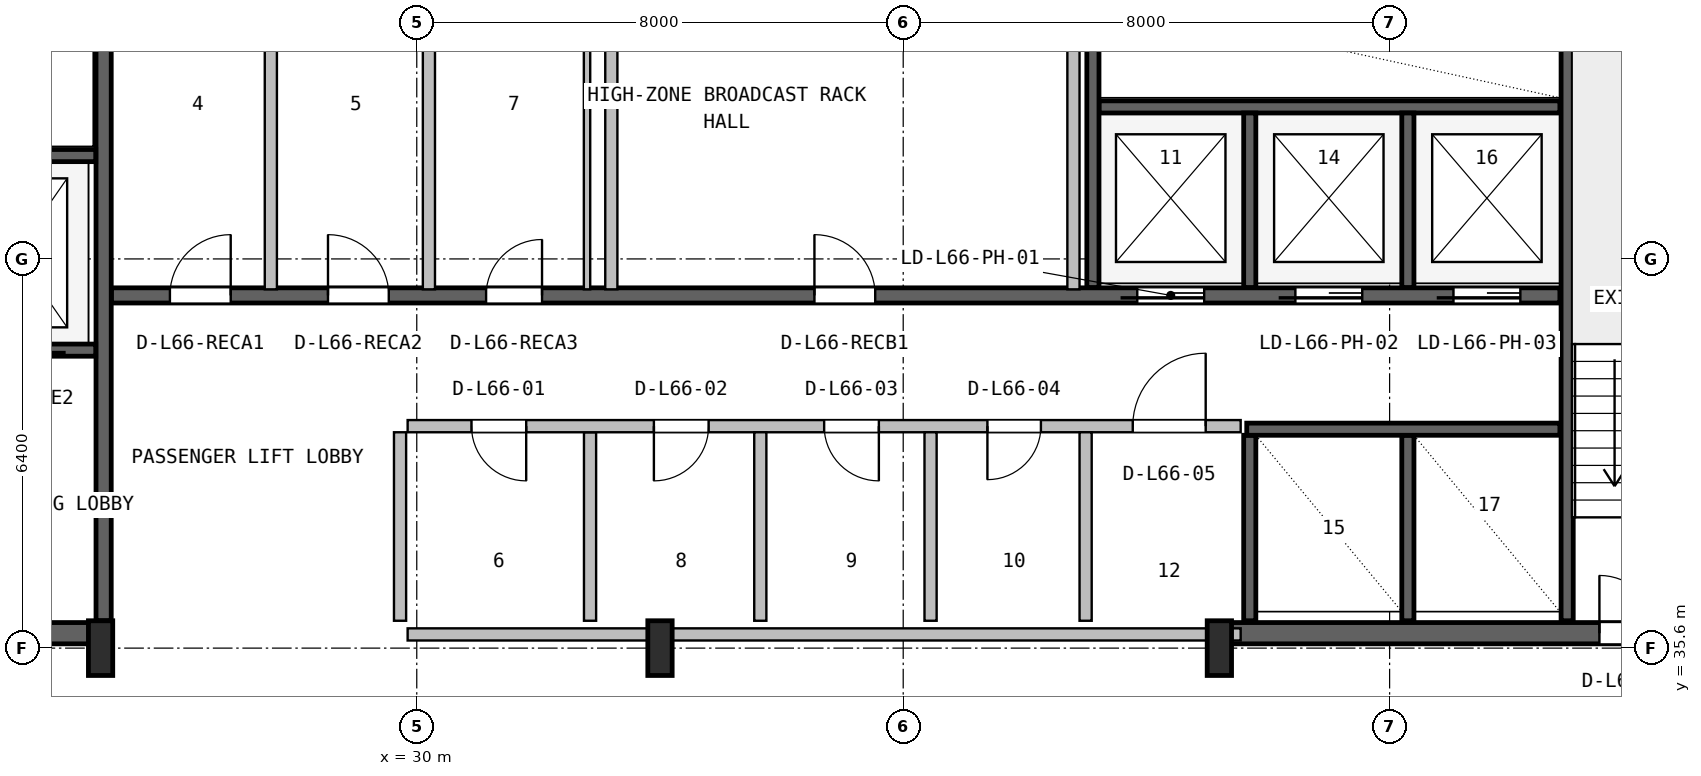
"""IFC4 building model, lengths in metres.
Left out: names, types, materials, properties, quantities, classifications, styles, units other than length and angle.
Written with IfcOpenShell. Run it as: python <this file> out.ifc"""

import sys

from ifc_helpers import new_model, si_unit, direction, frame, frame_2d, origin, origin_2d, place, context, subcontext, project, spatial, rectangle, i_section, extrude, source, transform, mapped, element, fill, save


model = new_model("IFC4")
c1 = context("Model", 3, precision=1e-05, world=origin(), true_north=direction((0.0, 1.0)))
c2 = subcontext(c1, "Body", "Model", "MODEL_VIEW")
j1 = project(units=[si_unit("LENGTHUNIT", "METRE"), si_unit("PLANEANGLEUNIT", "RADIAN")], contexts=[c1])
p1 = place(None, origin())
s1 = spatial("IfcSite", under=j1, at=p1, CompositionType="ELEMENT")
p2 = place(p1, origin())
s2 = spatial("IfcBuilding", under=s1, at=p2, CompositionType="ELEMENT")
p3 = place(p2, frame((0.0, 0.0, 266.0)))
s3 = spatial("IfcBuildingStorey", under=s2, at=p3, CompositionType="ELEMENT", Elevation=266.0)
p4 = place(p3, frame((15.67, 35.845, 0.0), z_axis=(0.0, 0.0, 1.0), x_axis=(1.0, 0.0, 0.0)))
e1 = element("IfcWall", 1, at=p4, inside=s3, PredefinedType="SHEAR", context=c2, shape_type="SweptSolid", body=[
    extrude(rectangle(XDim=9.13, YDim=0.35, at=frame_2d((4.565, 0.0))), origin(), (0.0, 0.0, 1.0), 3.55),
])
p5 = place(p4, frame((5.4, 0.0, 0.0)))
e2 = element("IfcOpeningElement", 2, at=p5, cuts=e1, PredefinedType="OPENING", context=c2, shape_type="SweptSolid", body=[
    extrude(rectangle(XDim=1.0, YDim=2.1, at=frame_2d((0.5, 1.05))), frame((0.0, 0.185, 0.0), z_axis=(0.0, -1.0, 0.0), x_axis=(1.0, 0.0, 0.0)), (0.0, 0.0, 1.0), 0.37),
])
p6 = place(p3, frame((43.2, 35.845, 0.0), z_axis=(0.0, 0.0, 1.0), x_axis=(1.0, 0.0, 0.0)))
e3 = element("IfcWall", 3, at=p6, inside=s3, PredefinedType="SHEAR", context=c2, shape_type="SweptSolid", body=[
    extrude(rectangle(XDim=9.13, YDim=0.35, at=frame_2d((4.565, 0.0))), origin(), (0.0, 0.0, 1.0), 3.55),
])
p7 = place(p6, frame((6.25, 0.0, 0.0)))
e4 = element("IfcOpeningElement", 4, at=p7, cuts=e3, PredefinedType="OPENING", context=c2, shape_type="SweptSolid", body=[
    extrude(rectangle(XDim=0.95, YDim=2.1, at=frame_2d((0.475, 1.05))), frame((0.0, 0.185, 0.0), z_axis=(0.0, -1.0, 0.0), x_axis=(1.0, 0.0, 0.0)), (0.0, 0.0, 1.0), 0.37),
])
m1 = source(origin(), c2, "Body", "SweptSolid", [
    extrude(i_section(OverallWidth=0.4, OverallDepth=0.9, WebThickness=0.016, FlangeThickness=0.028, FilletRadius=0.016, at=origin_2d()), origin(), (0.0, 0.0, 1.0), 3.8),
])
for number, where, z_axis, x_axis in (
    (5, (24.8, 35.6, 0.0), (0.0, 0.0, 1.0), (1.0, 0.0, 0.0)),
    (6, (34.0, 35.6, 0.0), (0.0, 0.0, 1.0), (1.0, 0.0, 0.0)),
    (7, (43.2, 35.6, 0.0), (0.0, 0.0, 1.0), (1.0, 0.0, 0.0)),
):
    element("IfcColumn", number, at=place(p3, frame(where, z_axis=z_axis, x_axis=x_axis)), inside=s3, PredefinedType="COLUMN", context=c2, shape_type="MappedRepresentation", body=[
        mapped(m1, transform((0.0, 0.0, 0.0), x_axis=(1.0, 0.0, 0.0), y_axis=(0.0, 1.0, 0.0), z_axis=(0.0, 0.0, 1.0), scale=1.0)),
    ])
p8 = place(p3, frame((24.85, 36.05, 0.0), z_axis=(0.0, 0.0, 1.0), x_axis=(0.0, 1.0, 0.0)))
e8 = element("IfcWall", 8, at=p8, inside=s3, PredefinedType="SHEAR", context=c2, shape_type="SweptSolid", body=[
    extrude(rectangle(XDim=10.45, YDim=0.25, at=frame_2d((5.225, 0.0))), origin(), (0.0, 0.0, 1.0), 3.55),
])
p9 = place(p3, frame((19.2, 40.5, 0.0), z_axis=(0.0, 0.0, 1.0), x_axis=(1.0, 0.0, 0.0)))
e9 = element("IfcWall", 9, at=p9, inside=s3, PredefinedType="SHEAR", context=c2, shape_type="SweptSolid", body=[
    extrude(rectangle(XDim=5.52, YDim=0.2, at=frame_2d((2.76, 0.0))), origin(), (0.0, 0.0, 1.0), 3.55),
])
p10 = place(p9, frame((1.05, 0.0, 0.0)))
e10 = element("IfcOpeningElement", 10, at=p10, cuts=e9, PredefinedType="OPENING", context=c2, shape_type="SweptSolid", body=[
    extrude(rectangle(XDim=1.1, YDim=2.18, at=frame_2d((0.55, 1.09))), frame((0.0, 0.11, 0.0), z_axis=(0.0, -1.0, 0.0), x_axis=(1.0, 0.0, 0.0)), (0.0, 0.0, 1.0), 0.22),
])
p11 = place(p9, frame((3.65, 0.0, 0.0)))
e11 = element("IfcOpeningElement", 11, at=p11, cuts=e9, PredefinedType="OPENING", context=c2, shape_type="SweptSolid", body=[
    extrude(rectangle(XDim=1.1, YDim=2.18, at=frame_2d((0.55, 1.09))), frame((0.0, 0.11, 0.0), z_axis=(0.0, -1.0, 0.0), x_axis=(1.0, 0.0, 0.0)), (0.0, 0.0, 1.0), 0.22),
])
p12 = place(p3, frame((19.2, 43.7, 0.0), z_axis=(0.0, 0.0, 1.0), x_axis=(1.0, 0.0, 0.0)))
e12 = element("IfcWall", 12, at=p12, inside=s3, PredefinedType="SHEAR", context=c2, shape_type="SweptSolid", body=[
    extrude(rectangle(XDim=5.52, YDim=0.2, at=frame_2d((2.76, 0.0))), origin(), (0.0, 0.0, 1.0), 3.55),
])
p13 = place(p3, frame((48.92, 36.05, 0.0), z_axis=(0.0, 0.0, 1.0), x_axis=(0.0, 1.0, 0.0)))
e13 = element("IfcWall", 13, at=p13, inside=s3, PredefinedType="SHEAR", context=c2, shape_type="SweptSolid", body=[
    extrude(rectangle(XDim=10.5, YDim=0.2, at=frame_2d((5.25, 0.0))), origin(), (0.0, 0.0, 1.0), 3.55),
])
p14 = place(p3, frame((24.98, 41.4, 0.0), z_axis=(0.0, 0.0, 1.0), x_axis=(1.0, 0.0, 0.0)))
e14 = element("IfcWall", 14, at=p14, inside=s3, PredefinedType="SHEAR", context=c2, shape_type="SweptSolid", body=[
    extrude(rectangle(XDim=23.82, YDim=0.25, at=frame_2d((11.91, 0.0))), origin(), (0.0, 0.0, 1.0), 3.55),
])
p15 = place(p14, frame((16.87, 0.0, 0.0)))
e15 = element("IfcOpeningElement", 15, at=p15, cuts=e14, PredefinedType="OPENING", context=c2, shape_type="SweptSolid", body=[
    extrude(rectangle(XDim=1.1, YDim=2.18, at=frame_2d((0.55, 1.09))), frame((0.0, 0.135, 0.0), z_axis=(0.0, -1.0, 0.0), x_axis=(1.0, 0.0, 0.0)), (0.0, 0.0, 1.0), 0.27),
])
p16 = place(p14, frame((19.47, 0.0, 0.0)))
e16 = element("IfcOpeningElement", 16, at=p16, cuts=e14, PredefinedType="OPENING", context=c2, shape_type="SweptSolid", body=[
    extrude(rectangle(XDim=1.1, YDim=2.18, at=frame_2d((0.55, 1.09))), frame((0.0, 0.135, 0.0), z_axis=(0.0, -1.0, 0.0), x_axis=(1.0, 0.0, 0.0)), (0.0, 0.0, 1.0), 0.27),
])
p17 = place(p14, frame((22.07, 0.0, 0.0)))
e17 = element("IfcOpeningElement", 17, at=p17, cuts=e14, PredefinedType="OPENING", context=c2, shape_type="SweptSolid", body=[
    extrude(rectangle(XDim=1.1, YDim=2.18, at=frame_2d((0.55, 1.09))), frame((0.0, 0.135, 0.0), z_axis=(0.0, -1.0, 0.0), x_axis=(1.0, 0.0, 0.0)), (0.0, 0.0, 1.0), 0.27),
])
p18 = place(p14, frame((0.96, 0.0, 0.0)))
e18 = element("IfcOpeningElement", 18, at=p18, cuts=e14, PredefinedType="OPENING", context=c2, shape_type="SweptSolid", body=[
    extrude(rectangle(XDim=1.0, YDim=2.08, at=frame_2d((0.5, 1.04))), frame((0.0, 0.135, 0.0), z_axis=(0.0, -1.0, 0.0), x_axis=(1.0, 0.0, 0.0)), (0.0, 0.0, 1.0), 0.27),
])
p19 = place(p14, frame((3.56, 0.0, 0.0)))
e19 = element("IfcOpeningElement", 19, at=p19, cuts=e14, PredefinedType="OPENING", context=c2, shape_type="SweptSolid", body=[
    extrude(rectangle(XDim=1.0, YDim=2.08, at=frame_2d((0.5, 1.04))), frame((0.0, 0.135, 0.0), z_axis=(0.0, -1.0, 0.0), x_axis=(1.0, 0.0, 0.0)), (0.0, 0.0, 1.0), 0.27),
])
p20 = place(p14, frame((6.16, 0.0, 0.0)))
e20 = element("IfcOpeningElement", 20, at=p20, cuts=e14, PredefinedType="OPENING", context=c2, shape_type="SweptSolid", body=[
    extrude(rectangle(XDim=0.92, YDim=2.08, at=frame_2d((0.46, 1.04))), frame((0.0, 0.135, 0.0), z_axis=(0.0, -1.0, 0.0), x_axis=(1.0, 0.0, 0.0)), (0.0, 0.0, 1.0), 0.27),
])
p21 = place(p14, frame((11.56, 0.0, 0.0)))
e21 = element("IfcOpeningElement", 21, at=p21, cuts=e14, PredefinedType="OPENING", context=c2, shape_type="SweptSolid", body=[
    extrude(rectangle(XDim=1.0, YDim=2.08, at=frame_2d((0.5, 1.04))), frame((0.0, 0.135, 0.0), z_axis=(0.0, -1.0, 0.0), x_axis=(1.0, 0.0, 0.0)), (0.0, 0.0, 1.0), 0.27),
])
p22 = place(p3, frame((41.22, 44.5, 0.0), z_axis=(0.0, 0.0, 1.0), x_axis=(1.0, 0.0, 0.0)))
e22 = element("IfcWall", 22, at=p22, inside=s3, PredefinedType="SHEAR", context=c2, shape_type="SweptSolid", body=[
    extrude(rectangle(XDim=7.58, YDim=0.2, at=frame_2d((3.79, 0.0))), origin(), (0.0, 0.0, 1.0), 3.55),
])
p23 = place(p3, frame((41.12, 41.53, 0.0), z_axis=(0.0, 0.0, 1.0), x_axis=(0.0, 1.0, 0.0)))
e23 = element("IfcWall", 23, at=p23, inside=s3, PredefinedType="SHEAR", context=c2, shape_type="SweptSolid", body=[
    extrude(rectangle(XDim=5.02, YDim=0.2, at=frame_2d((2.51, 0.0))), origin(), (0.0, 0.0, 1.0), 3.55),
])
for number, where, z_axis, x_axis in (
    (24, (43.7, 41.53, 0.0), (0.0, 0.0, 1.0), (0.0, 1.0, 0.0)),
    (25, (46.3, 41.53, 0.0), (0.0, 0.0, 1.0), (0.0, 1.0, 0.0)),
):
    element("IfcWall", number, at=place(p3, frame(where, z_axis=z_axis, x_axis=x_axis)), inside=s3, PredefinedType="SHEAR", context=c2, shape_type="SweptSolid", body=[
        extrude(rectangle(XDim=2.87, YDim=0.2, at=frame_2d((1.435, 0.0))), origin(), (0.0, 0.0, 1.0), 3.55),
    ])
for number, where, z_axis, x_axis in (
    (26, (43.7, 36.05, 0.0), (0.0, 0.0, 1.0), (0.0, 1.0, 0.0)),
    (27, (46.3, 36.05, 0.0), (0.0, 0.0, 1.0), (0.0, 1.0, 0.0)),
):
    element("IfcWall", number, at=place(p3, frame(where, z_axis=z_axis, x_axis=x_axis)), inside=s3, PredefinedType="SHEAR", context=c2, shape_type="SweptSolid", body=[
        extrude(rectangle(XDim=3.05, YDim=0.2, at=frame_2d((1.525, 0.0))), origin(), (0.0, 0.0, 1.0), 3.55),
    ])
p24 = place(p3, frame((43.65, 39.2, 0.0), z_axis=(0.0, 0.0, 1.0), x_axis=(1.0, 0.0, 0.0)))
e28 = element("IfcWall", 28, at=p24, inside=s3, PredefinedType="SHEAR", context=c2, shape_type="SweptSolid", body=[
    extrude(rectangle(XDim=5.15, YDim=0.2, at=frame_2d((2.575, 0.0))), origin(), (0.0, 0.0, 1.0), 3.55),
])
p25 = place(p3, frame((29.85, 35.825, 0.0), z_axis=(0.0, 0.0, 1.0), x_axis=(1.0, 0.0, 0.0)))
e29 = element("IfcWall", 29, at=p25, inside=s3, PredefinedType="SOLIDWALL", context=c2, shape_type="SweptSolid", body=[
    extrude(rectangle(XDim=13.7, YDim=0.2, at=frame_2d((6.85, 0.0))), origin(), (0.0, 0.0, 1.0), 2.575),
])
p26 = place(p3, frame((32.85, 36.05, 0.0), z_axis=(0.0, 0.0, 1.0), x_axis=(0.0, 1.0, 0.0)))
e30 = element("IfcWall", 30, at=p26, inside=s3, PredefinedType="PLUMBINGWALL", context=c2, shape_type="SweptSolid", body=[
    extrude(rectangle(XDim=3.1, YDim=0.2, at=frame_2d((1.55, 0.0))), origin(), (0.0, 0.0, 1.0), 3.53),
])
p27 = place(p3, frame((29.85, 39.25, 0.0), z_axis=(0.0, 0.0, 1.0), x_axis=(1.0, 0.0, 0.0)))
e31 = element("IfcWall", 31, at=p27, inside=s3, PredefinedType="SOLIDWALL", context=c2, shape_type="SweptSolid", body=[
    extrude(rectangle(XDim=13.7, YDim=0.2, at=frame_2d((6.85, 0.0))), origin(), (0.0, 0.0, 1.0), 3.53),
])
p28 = place(p27, frame((1.05, 0.0, 0.0)))
e32 = element("IfcOpeningElement", 32, at=p28, cuts=e31, PredefinedType="OPENING", context=c2, shape_type="SweptSolid", body=[
    extrude(rectangle(XDim=0.9, YDim=2.06, at=frame_2d((0.45, 1.03))), frame((0.0, 0.11, 0.0), z_axis=(0.0, -1.0, 0.0), x_axis=(1.0, 0.0, 0.0)), (0.0, 0.0, 1.0), 0.22),
])
p29 = place(p27, frame((4.05, 0.0, 0.0)))
e33 = element("IfcOpeningElement", 33, at=p29, cuts=e31, PredefinedType="OPENING", context=c2, shape_type="SweptSolid", body=[
    extrude(rectangle(XDim=0.9, YDim=2.06, at=frame_2d((0.45, 1.03))), frame((0.0, 0.11, 0.0), z_axis=(0.0, -1.0, 0.0), x_axis=(1.0, 0.0, 0.0)), (0.0, 0.0, 1.0), 0.22),
])
p30 = place(p27, frame((6.85, 0.0, 0.0)))
e34 = element("IfcOpeningElement", 34, at=p30, cuts=e31, PredefinedType="OPENING", context=c2, shape_type="SweptSolid", body=[
    extrude(rectangle(XDim=0.9, YDim=2.06, at=frame_2d((0.45, 1.03))), frame((0.0, 0.11, 0.0), z_axis=(0.0, -1.0, 0.0), x_axis=(1.0, 0.0, 0.0)), (0.0, 0.0, 1.0), 0.22),
])
p31 = place(p27, frame((9.535, 0.0, 0.0)))
e35 = element("IfcOpeningElement", 35, at=p31, cuts=e31, PredefinedType="OPENING", context=c2, shape_type="SweptSolid", body=[
    extrude(rectangle(XDim=0.88, YDim=2.06, at=frame_2d((0.44, 1.03))), frame((0.0, 0.11, 0.0), z_axis=(0.0, -1.0, 0.0), x_axis=(1.0, 0.0, 0.0)), (0.0, 0.0, 1.0), 0.22),
])
p32 = place(p27, frame((11.925, 0.0, 0.0)))
e36 = element("IfcOpeningElement", 36, at=p32, cuts=e31, PredefinedType="OPENING", context=c2, shape_type="SweptSolid", body=[
    extrude(rectangle(XDim=1.2, YDim=2.1, at=frame_2d((0.6, 1.05))), frame((0.0, 0.11, 0.0), z_axis=(0.0, -1.0, 0.0), x_axis=(1.0, 0.0, 0.0)), (0.0, 0.0, 1.0), 0.22),
])
for number, where, z_axis, x_axis in (
    (37, (29.725, 36.05, 0.0), (0.0, 0.0, 1.0), (0.0, 1.0, 0.0)),
    (38, (35.65, 36.05, 0.0), (0.0, 0.0, 1.0), (0.0, 1.0, 0.0)),
    (39, (38.45, 36.05, 0.0), (0.0, 0.0, 1.0), (0.0, 1.0, 0.0)),
):
    element("IfcWall", number, at=place(p3, frame(where, z_axis=z_axis, x_axis=x_axis)), inside=s3, PredefinedType="PLUMBINGWALL", context=c2, shape_type="SweptSolid", body=[
        extrude(rectangle(XDim=3.1, YDim=0.2, at=frame_2d((1.55, 0.0))), origin(), (0.0, 0.0, 1.0), 3.53),
    ])
p33 = place(p3, frame((41.0, 36.05, 0.0), z_axis=(0.0, 0.0, 1.0), x_axis=(0.0, 1.0, 0.0)))
e40 = element("IfcWall", 40, at=p33, inside=s3, PredefinedType="SOLIDWALL", context=c2, shape_type="SweptSolid", body=[
    extrude(rectangle(XDim=3.1, YDim=0.2, at=frame_2d((1.55, 0.0))), origin(), (0.0, 0.0, 1.0), 3.53),
])
for number, where, z_axis, x_axis in (
    (41, (27.6, 41.5, 0.0), (0.0, 0.0, 1.0), (0.0, 1.0, 0.0)),
    (42, (30.2, 41.5, 0.0), (0.0, 0.0, 1.0), (0.0, 1.0, 0.0)),
):
    element("IfcWall", number, at=place(p3, frame(where, z_axis=z_axis, x_axis=x_axis)), inside=s3, PredefinedType="SOLIDWALL", context=c2, shape_type="SweptSolid", body=[
        extrude(rectangle(XDim=5.02, YDim=0.2, at=frame_2d((2.51, 0.0))), origin(), (0.0, 0.0, 1.0), 3.53),
    ])
p34 = place(p3, frame((32.8, 41.5, 0.0), z_axis=(0.0, 0.0, 1.0), x_axis=(0.0, 1.0, 0.0)))
e43 = element("IfcWall", 43, at=p34, inside=s3, PredefinedType="PARTITIONING", context=c2, shape_type="SweptSolid", body=[
    extrude(rectangle(XDim=5.02, YDim=0.105, at=frame_2d((2.51, 0.0))), origin(), (0.0, 0.0, 1.0), 3.53),
])
for number, where, z_axis, x_axis in (
    (44, (40.8, 41.5, 0.0), (0.0, 0.0, 1.0), (0.0, 1.0, 0.0)),
    (45, (33.2, 41.5, 0.0), (0.0, 0.0, 1.0), (0.0, 1.0, 0.0)),
):
    element("IfcWall", number, at=place(p3, frame(where, z_axis=z_axis, x_axis=x_axis)), inside=s3, PredefinedType="SOLIDWALL", context=c2, shape_type="SweptSolid", body=[
        extrude(rectangle(XDim=5.02, YDim=0.2, at=frame_2d((2.51, 0.0))), origin(), (0.0, 0.0, 1.0), 3.53),
    ])
m2 = source(origin(), c2, "Body", "SweptSolid", [
    extrude(rectangle(XDim=0.95, YDim=2.1, at=frame_2d((0.475, 1.05))), frame((0.0, 0.025, 0.0), z_axis=(0.0, -1.0, 0.0), x_axis=(1.0, 0.0, 0.0)), (0.0, 0.0, 1.0), 0.05),
])
p35 = place(p7, origin())
e46 = element("IfcDoor", 46, at=p35, inside=s3, OperationType="SINGLE_SWING_LEFT", PredefinedType="DOOR", context=c2, shape_type="MappedRepresentation", body=[
    mapped(m2, transform((0.0, 0.0, 0.0), x_axis=(1.0, 0.0, 0.0), y_axis=(0.0, 1.0, 0.0), z_axis=(0.0, 0.0, 1.0), scale=1.0)),
])
fill(e4, e46)
m3 = source(origin(), c2, "Body", "SweptSolid", [
    extrude(rectangle(XDim=1.1, YDim=2.18, at=frame_2d((0.55, 1.09))), frame((0.0, 0.025, 0.0), z_axis=(0.0, -1.0, 0.0), x_axis=(1.0, 0.0, 0.0)), (0.0, 0.0, 1.0), 0.05),
])
p36 = place(p15, frame((1.1, 0.0, 0.0), z_axis=(0.0, 0.0, 1.0), x_axis=(-1.0, 0.0, 0.0)))
e47 = element("IfcDoor", 47, at=p36, inside=s3, OperationType="SLIDING_TO_LEFT", PredefinedType="DOOR", context=c2, shape_type="MappedRepresentation", body=[
    mapped(m3, transform((0.0, 0.0, 0.0), x_axis=(1.0, 0.0, 0.0), y_axis=(0.0, 1.0, 0.0), z_axis=(0.0, 0.0, 1.0), scale=1.0)),
])
fill(e15, e47)
p37 = place(p16, frame((1.1, 0.0, 0.0), z_axis=(0.0, 0.0, 1.0), x_axis=(-1.0, 0.0, 0.0)))
e48 = element("IfcDoor", 48, at=p37, inside=s3, OperationType="SLIDING_TO_LEFT", PredefinedType="DOOR", context=c2, shape_type="MappedRepresentation", body=[
    mapped(m3, transform((0.0, 0.0, 0.0), x_axis=(1.0, 0.0, 0.0), y_axis=(0.0, 1.0, 0.0), z_axis=(0.0, 0.0, 1.0), scale=1.0)),
])
fill(e16, e48)
p38 = place(p17, frame((1.1, 0.0, 0.0), z_axis=(0.0, 0.0, 1.0), x_axis=(-1.0, 0.0, 0.0)))
e49 = element("IfcDoor", 49, at=p38, inside=s3, OperationType="SLIDING_TO_LEFT", PredefinedType="DOOR", context=c2, shape_type="MappedRepresentation", body=[
    mapped(m3, transform((0.0, 0.0, 0.0), x_axis=(1.0, 0.0, 0.0), y_axis=(0.0, 1.0, 0.0), z_axis=(0.0, 0.0, 1.0), scale=1.0)),
])
fill(e17, e49)
m4 = source(origin(), c2, "Body", "SweptSolid", [
    extrude(rectangle(XDim=1.0, YDim=2.08, at=frame_2d((0.5, 1.04))), frame((0.0, 0.025, 0.0), z_axis=(0.0, -1.0, 0.0), x_axis=(1.0, 0.0, 0.0)), (0.0, 0.0, 1.0), 0.05),
])
p39 = place(p18, origin())
e50 = element("IfcDoor", 50, at=p39, inside=s3, OperationType="SINGLE_SWING_RIGHT", PredefinedType="DOOR", context=c2, shape_type="MappedRepresentation", body=[
    mapped(m4, transform((0.0, 0.0, 0.0), x_axis=(1.0, 0.0, 0.0), y_axis=(0.0, 1.0, 0.0), z_axis=(0.0, 0.0, 1.0), scale=1.0)),
])
fill(e18, e50)
p40 = place(p19, origin())
e51 = element("IfcDoor", 51, at=p40, inside=s3, OperationType="SINGLE_SWING_LEFT", PredefinedType="DOOR", context=c2, shape_type="MappedRepresentation", body=[
    mapped(m4, transform((0.0, 0.0, 0.0), x_axis=(1.0, 0.0, 0.0), y_axis=(0.0, 1.0, 0.0), z_axis=(0.0, 0.0, 1.0), scale=1.0)),
])
fill(e19, e51)
m5 = source(origin(), c2, "Body", "SweptSolid", [
    extrude(rectangle(XDim=0.92, YDim=2.08, at=frame_2d((0.46, 1.04))), frame((0.0, 0.025, 0.0), z_axis=(0.0, -1.0, 0.0), x_axis=(1.0, 0.0, 0.0)), (0.0, 0.0, 1.0), 0.05),
])
p41 = place(p20, origin())
e52 = element("IfcDoor", 52, at=p41, inside=s3, OperationType="SINGLE_SWING_RIGHT", PredefinedType="DOOR", context=c2, shape_type="MappedRepresentation", body=[
    mapped(m5, transform((0.0, 0.0, 0.0), x_axis=(1.0, 0.0, 0.0), y_axis=(0.0, 1.0, 0.0), z_axis=(0.0, 0.0, 1.0), scale=1.0)),
])
fill(e20, e52)
p42 = place(p21, origin())
e53 = element("IfcDoor", 53, at=p42, inside=s3, OperationType="SINGLE_SWING_LEFT", PredefinedType="DOOR", context=c2, shape_type="MappedRepresentation", body=[
    mapped(m4, transform((0.0, 0.0, 0.0), x_axis=(1.0, 0.0, 0.0), y_axis=(0.0, 1.0, 0.0), z_axis=(0.0, 0.0, 1.0), scale=1.0)),
])
fill(e21, e53)
m6 = source(origin(), c2, "Body", "SweptSolid", [
    extrude(rectangle(XDim=0.9, YDim=2.06, at=frame_2d((0.45, 1.03))), frame((0.0, 0.025, 0.0), z_axis=(0.0, -1.0, 0.0), x_axis=(1.0, 0.0, 0.0)), (0.0, 0.0, 1.0), 0.05),
])
p43 = place(p28, frame((0.9, 0.0, 0.0), z_axis=(0.0, 0.0, 1.0), x_axis=(-1.0, 0.0, 0.0)))
e54 = element("IfcDoor", 54, at=p43, inside=s3, OperationType="SINGLE_SWING_RIGHT", PredefinedType="DOOR", context=c2, shape_type="MappedRepresentation", body=[
    mapped(m6, transform((0.0, 0.0, 0.0), x_axis=(1.0, 0.0, 0.0), y_axis=(0.0, 1.0, 0.0), z_axis=(0.0, 0.0, 1.0), scale=1.0)),
])
fill(e32, e54)
p44 = place(p29, frame((0.9, 0.0, 0.0), z_axis=(0.0, 0.0, 1.0), x_axis=(-1.0, 0.0, 0.0)))
e55 = element("IfcDoor", 55, at=p44, inside=s3, OperationType="SINGLE_SWING_LEFT", PredefinedType="DOOR", context=c2, shape_type="MappedRepresentation", body=[
    mapped(m6, transform((0.0, 0.0, 0.0), x_axis=(1.0, 0.0, 0.0), y_axis=(0.0, 1.0, 0.0), z_axis=(0.0, 0.0, 1.0), scale=1.0)),
])
fill(e33, e55)
p45 = place(p30, frame((0.9, 0.0, 0.0), z_axis=(0.0, 0.0, 1.0), x_axis=(-1.0, 0.0, 0.0)))
e56 = element("IfcDoor", 56, at=p45, inside=s3, OperationType="SINGLE_SWING_RIGHT", PredefinedType="DOOR", context=c2, shape_type="MappedRepresentation", body=[
    mapped(m6, transform((0.0, 0.0, 0.0), x_axis=(1.0, 0.0, 0.0), y_axis=(0.0, 1.0, 0.0), z_axis=(0.0, 0.0, 1.0), scale=1.0)),
])
fill(e34, e56)
m7 = source(origin(), c2, "Body", "SweptSolid", [
    extrude(rectangle(XDim=0.88, YDim=2.06, at=frame_2d((0.44, 1.03))), frame((0.0, 0.025, 0.0), z_axis=(0.0, -1.0, 0.0), x_axis=(1.0, 0.0, 0.0)), (0.0, 0.0, 1.0), 0.05),
])
p46 = place(p31, frame((0.88, 0.0, 0.0), z_axis=(0.0, 0.0, 1.0), x_axis=(-1.0, 0.0, 0.0)))
e57 = element("IfcDoor", 57, at=p46, inside=s3, OperationType="SINGLE_SWING_LEFT", PredefinedType="DOOR", context=c2, shape_type="MappedRepresentation", body=[
    mapped(m7, transform((0.0, 0.0, 0.0), x_axis=(1.0, 0.0, 0.0), y_axis=(0.0, 1.0, 0.0), z_axis=(0.0, 0.0, 1.0), scale=1.0)),
])
fill(e35, e57)
m8 = source(origin(), c2, "Body", "SweptSolid", [
    extrude(rectangle(XDim=1.2, YDim=2.1, at=frame_2d((0.6, 1.05))), frame((0.0, 0.025, 0.0), z_axis=(0.0, -1.0, 0.0), x_axis=(1.0, 0.0, 0.0)), (0.0, 0.0, 1.0), 0.05),
])
p47 = place(p32, origin())
e58 = element("IfcDoor", 58, at=p47, inside=s3, OperationType="SINGLE_SWING_RIGHT", PredefinedType="DOOR", context=c2, shape_type="MappedRepresentation", body=[
    mapped(m8, transform((0.0, 0.0, 0.0), x_axis=(1.0, 0.0, 0.0), y_axis=(0.0, 1.0, 0.0), z_axis=(0.0, 0.0, 1.0), scale=1.0)),
])
fill(e36, e58)
save(model, sys.argv[1])
